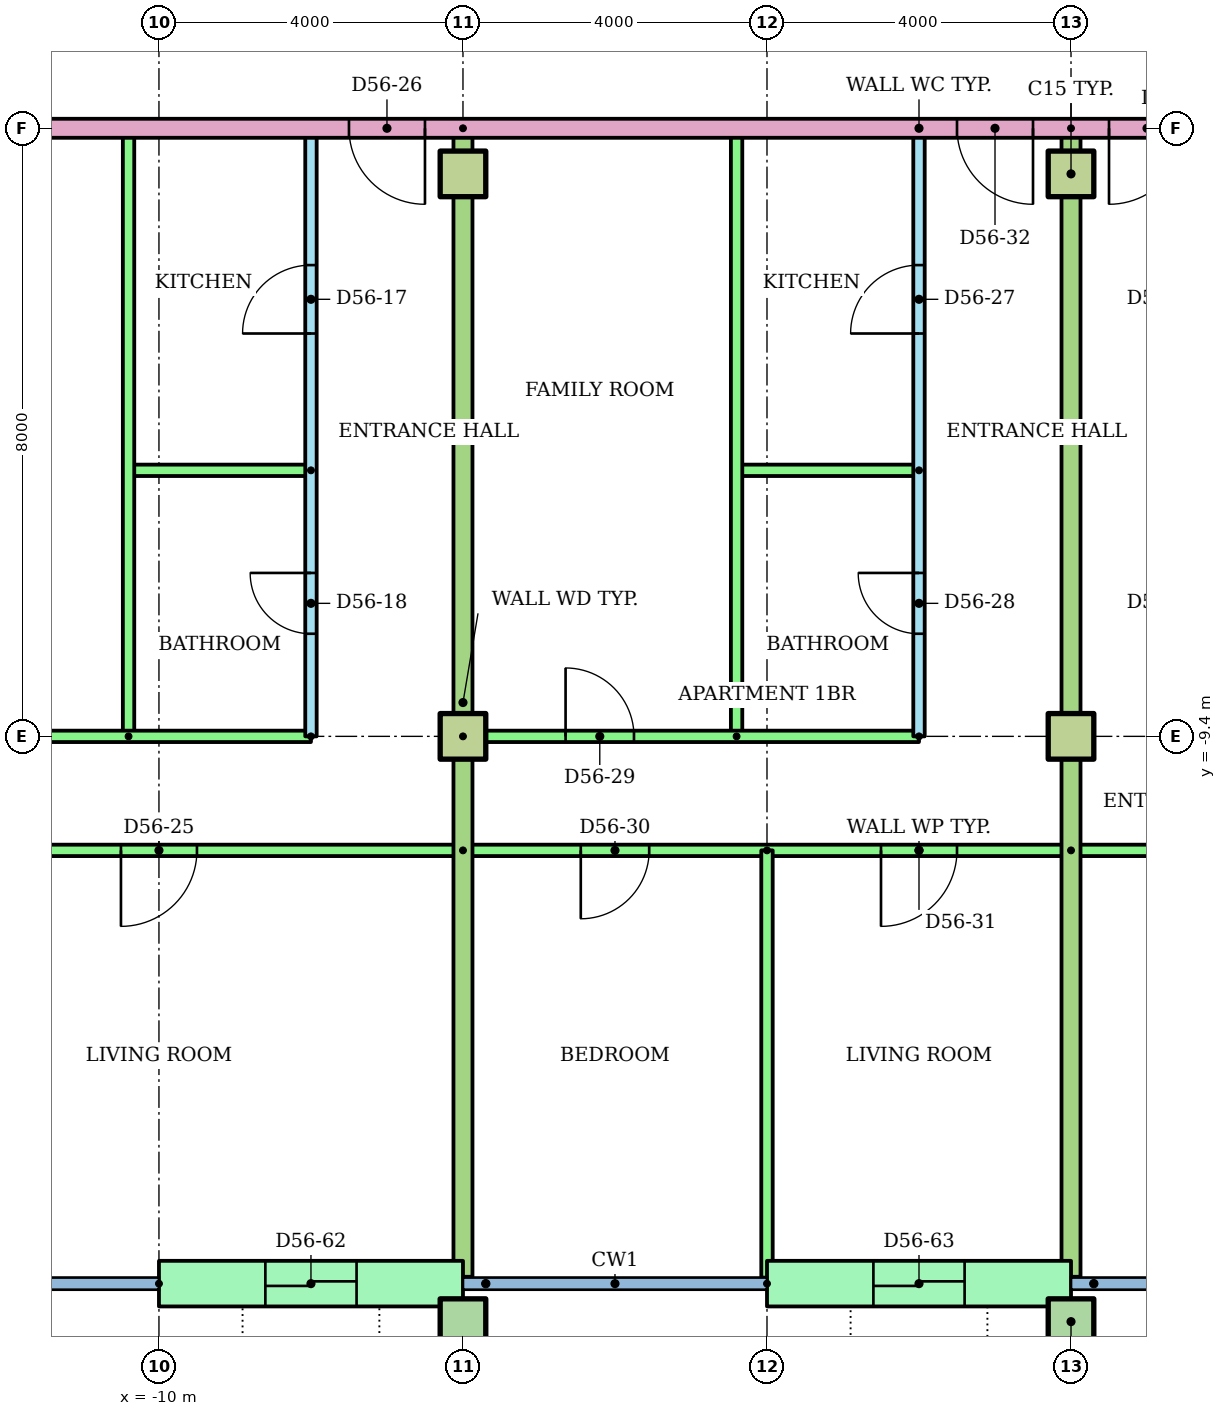
"""IFC4 building model, lengths in metres.
Left out: names, types, materials, properties, quantities, classifications, styles, units other than length and angle.
Written with IfcOpenShell. Run it as: python <this file> out.ifc"""

import sys

from ifc_helpers import new_model, si_unit, direction, frame, frame_2d, origin, origin_2d, place, context, subcontext, project, spatial, rectangle, hollow_rectangle, extrude, element, fill, save


model = new_model("IFC4")
c1 = context("Model", 3, precision=1e-05, world=origin(), true_north=direction((0.0, 1.0)))
c2 = subcontext(c1, "Body", "Model", "MODEL_VIEW")
j1 = project(units=[si_unit("LENGTHUNIT", "METRE"), si_unit("PLANEANGLEUNIT", "RADIAN")], contexts=[c1])
p1 = place(None, origin())
s1 = spatial("IfcSite", under=j1, at=p1, CompositionType="ELEMENT")
p2 = place(p1, origin())
s2 = spatial("IfcBuilding", under=s1, at=p2, CompositionType="ELEMENT")
p3 = place(p2, frame((0.0, 0.0, 217.2)))
s3 = spatial("IfcBuildingStorey", under=s2, at=p3, CompositionType="ELEMENT", Elevation=217.2)
for number, where in (
    (1, (-6.0, -17.1, 0.0)),
    (2, (2.0, -17.1, 0.0)),
):
    element("IfcColumn", number, at=place(p3, frame(where)), inside=s3, PredefinedType="COLUMN", context=c2, shape_type="SweptSolid", body=[
        extrude(hollow_rectangle(XDim=0.6, YDim=0.6, WallThickness=0.03, at=origin_2d()), origin(), (0.0, 0.0, 1.0), 3.2),
    ])
for number, where in (
    (3, (-6.0, -9.4, 0.0)),
    (4, (2.0, -9.4, 0.0)),
    (5, (-6.0, -2.0, 0.0)),
    (6, (2.0, -2.0, 0.0)),
):
    element("IfcColumn", number, at=place(p3, frame(where)), inside=s3, PredefinedType="COLUMN", context=c2, shape_type="SweptSolid", body=[
        extrude(rectangle(XDim=0.6, YDim=0.6, at=origin_2d()), origin(), (0.0, 0.0, 1.0), 3.2),
    ])
p4 = place(p3, frame((-10.0, -16.6, 0.0)))
e7 = element("IfcWall", 7, at=p4, inside=s3, PredefinedType="STANDARD", context=c2, shape_type="SweptSolid", body=[
    extrude(rectangle(XDim=4.0, YDim=0.6, at=frame_2d((2.0, 0.0))), origin(), (0.0, 0.0, 1.0), 2.92),
])
p5 = place(p4, frame((1.4, 0.0, 0.0)))
e8 = element("IfcOpeningElement", 8, at=p5, cuts=e7, PredefinedType="OPENING", context=c2, shape_type="SweptSolid", body=[
    extrude(rectangle(XDim=1.2, YDim=2.1, at=frame_2d((0.6, 1.05))), frame((0.0, 0.31, 0.0), z_axis=(0.0, -1.0, 0.0), x_axis=(1.0, 0.0, 0.0)), (0.0, 0.0, 1.0), 0.62),
])
p6 = place(p3, frame((-2.0, -16.6, 0.0)))
e9 = element("IfcWall", 9, at=p6, inside=s3, PredefinedType="STANDARD", context=c2, shape_type="SweptSolid", body=[
    extrude(rectangle(XDim=4.0, YDim=0.6, at=frame_2d((2.0, 0.0))), origin(), (0.0, 0.0, 1.0), 2.92),
])
p7 = place(p6, frame((1.4, 0.0, 0.0)))
e10 = element("IfcOpeningElement", 10, at=p7, cuts=e9, PredefinedType="OPENING", context=c2, shape_type="SweptSolid", body=[
    extrude(rectangle(XDim=1.2, YDim=2.1, at=frame_2d((0.6, 1.05))), frame((0.0, 0.31, 0.0), z_axis=(0.0, -1.0, 0.0), x_axis=(1.0, 0.0, 0.0)), (0.0, 0.0, 1.0), 0.62),
])
p8 = place(p3, frame((-8.0, -9.4, 0.0), z_axis=(0.0, 0.0, 1.0), x_axis=(0.0, 1.0, 0.0)))
e11 = element("IfcWall", 11, at=p8, inside=s3, PredefinedType="PARTITIONING", context=c2, shape_type="SweptSolid", body=[
    extrude(rectangle(XDim=8.0, YDim=0.15, at=frame_2d((4.0, 0.0))), origin(), (0.0, 0.0, 1.0), 2.4),
])
p9 = place(p8, frame((5.3, 0.0, 0.0)))
e12 = element("IfcOpeningElement", 12, at=p9, cuts=e11, PredefinedType="OPENING", context=c2, shape_type="SweptSolid", body=[
    extrude(rectangle(XDim=0.9, YDim=2.1, at=frame_2d((0.45, 1.05))), frame((0.0, 0.085, 0.0), z_axis=(0.0, -1.0, 0.0), x_axis=(1.0, 0.0, 0.0)), (0.0, 0.0, 1.0), 0.17),
])
p10 = place(p8, frame((1.35, 0.0, 0.0)))
e13 = element("IfcOpeningElement", 13, at=p10, cuts=e11, PredefinedType="OPENING", context=c2, shape_type="SweptSolid", body=[
    extrude(rectangle(XDim=0.8, YDim=2.1, at=frame_2d((0.4, 1.05))), frame((0.0, 0.085, 0.0), z_axis=(0.0, -1.0, 0.0), x_axis=(1.0, 0.0, 0.0)), (0.0, 0.0, 1.0), 0.17),
])
p11 = place(p3, frame((-8.0, -5.9, 0.0), z_axis=(0.0, 0.0, 1.0), x_axis=(-1.0, 0.0, 0.0)))
e14 = element("IfcWall", 14, at=p11, inside=s3, PredefinedType="PARTITIONING", context=c2, shape_type="SweptSolid", body=[
    extrude(rectangle(XDim=2.4, YDim=0.15, at=frame_2d((1.2, 0.0))), origin(), (0.0, 0.0, 1.0), 2.4),
])
p12 = place(p3, frame((-10.4, -9.4, 0.0), z_axis=(0.0, 0.0, 1.0), x_axis=(0.0, 1.0, 0.0)))
e15 = element("IfcWall", 15, at=p12, inside=s3, PredefinedType="PARTITIONING", context=c2, shape_type="SweptSolid", body=[
    extrude(rectangle(XDim=8.0, YDim=0.15, at=frame_2d((4.0, 0.0))), origin(), (0.0, 0.0, 1.0), 2.4),
])
p13 = place(p3, frame((-28.91, -9.4, 0.0)))
e16 = element("IfcWall", 16, at=p13, inside=s3, PredefinedType="PARTITIONING", context=c2, shape_type="SweptSolid", body=[
    extrude(rectangle(XDim=20.91, YDim=0.15, at=frame_2d((10.455, 0.0))), origin(), (0.0, 0.0, 1.0), 2.4),
])
p14 = place(p13, frame((15.81, 0.0, 0.0)))
e17 = element("IfcOpeningElement", 17, at=p14, cuts=e16, PredefinedType="OPENING", context=c2, shape_type="SweptSolid", body=[
    extrude(rectangle(XDim=0.9, YDim=2.1, at=frame_2d((0.45, 1.05))), frame((0.0, 0.085, 0.0), z_axis=(0.0, -1.0, 0.0), x_axis=(1.0, 0.0, 0.0)), (0.0, 0.0, 1.0), 0.17),
])
p15 = place(p13, frame((10.56, 0.0, 0.0)))
e18 = element("IfcOpeningElement", 18, at=p15, cuts=e16, PredefinedType="OPENING", context=c2, shape_type="SweptSolid", body=[
    extrude(rectangle(XDim=0.9, YDim=2.1, at=frame_2d((0.45, 1.05))), frame((0.0, 0.085, 0.0), z_axis=(0.0, -1.0, 0.0), x_axis=(1.0, 0.0, 0.0)), (0.0, 0.0, 1.0), 0.17),
])
p16 = place(p13, frame((3.66, 0.0, 0.0)))
e19 = element("IfcOpeningElement", 19, at=p16, cuts=e16, PredefinedType="OPENING", context=c2, shape_type="SweptSolid", body=[
    extrude(rectangle(XDim=0.9, YDim=2.1, at=frame_2d((0.45, 1.05))), frame((0.0, 0.085, 0.0), z_axis=(0.0, -1.0, 0.0), x_axis=(1.0, 0.0, 0.0)), (0.0, 0.0, 1.0), 0.17),
])
p17 = place(p3, frame((-6.0, -10.9, 0.0), z_axis=(0.0, 0.0, 1.0), x_axis=(-1.0, 0.0, 0.0)))
e20 = element("IfcWall", 20, at=p17, inside=s3, PredefinedType="PARTITIONING", context=c2, shape_type="SweptSolid", body=[
    extrude(rectangle(XDim=22.92, YDim=0.15, at=frame_2d((11.46, 0.0))), origin(), (0.0, 0.0, 1.0), 2.4),
])
p18 = place(p17, frame((20.0, 0.0, 0.0)))
e21 = element("IfcOpeningElement", 21, at=p18, cuts=e20, PredefinedType="OPENING", context=c2, shape_type="SweptSolid", body=[
    extrude(rectangle(XDim=0.9, YDim=2.1, at=frame_2d((0.45, 1.05))), frame((0.0, 0.085, 0.0), z_axis=(0.0, -1.0, 0.0), x_axis=(1.0, 0.0, 0.0)), (0.0, 0.0, 1.0), 0.17),
])
p19 = place(p17, frame((14.624, 0.0, 0.0)))
e22 = element("IfcOpeningElement", 22, at=p19, cuts=e20, PredefinedType="OPENING", context=c2, shape_type="SweptSolid", body=[
    extrude(rectangle(XDim=0.9, YDim=2.1, at=frame_2d((0.45, 1.05))), frame((0.0, 0.085, 0.0), z_axis=(0.0, -1.0, 0.0), x_axis=(1.0, 0.0, 0.0)), (0.0, 0.0, 1.0), 0.17),
])
p20 = place(p17, frame((9.55, 0.0, 0.0)))
e23 = element("IfcOpeningElement", 23, at=p20, cuts=e20, PredefinedType="OPENING", context=c2, shape_type="SweptSolid", body=[
    extrude(rectangle(XDim=0.9, YDim=2.1, at=frame_2d((0.45, 1.05))), frame((0.0, 0.085, 0.0), z_axis=(0.0, -1.0, 0.0), x_axis=(1.0, 0.0, 0.0)), (0.0, 0.0, 1.0), 0.17),
])
p21 = place(p17, frame((3.5, 0.0, 0.0)))
e24 = element("IfcOpeningElement", 24, at=p21, cuts=e20, PredefinedType="OPENING", context=c2, shape_type="SweptSolid", body=[
    extrude(rectangle(XDim=1.0, YDim=2.1, at=frame_2d((0.5, 1.05))), frame((0.0, 0.085, 0.0), z_axis=(0.0, -1.0, 0.0), x_axis=(1.0, 0.0, 0.0)), (0.0, 0.0, 1.0), 0.17),
])
p22 = place(p3, frame((0.0, -9.4, 0.0), z_axis=(0.0, 0.0, 1.0), x_axis=(0.0, 1.0, 0.0)))
e25 = element("IfcWall", 25, at=p22, inside=s3, PredefinedType="PARTITIONING", context=c2, shape_type="SweptSolid", body=[
    extrude(rectangle(XDim=8.0, YDim=0.15, at=frame_2d((4.0, 0.0))), origin(), (0.0, 0.0, 1.0), 2.4),
])
p23 = place(p22, frame((5.3, 0.0, 0.0)))
e26 = element("IfcOpeningElement", 26, at=p23, cuts=e25, PredefinedType="OPENING", context=c2, shape_type="SweptSolid", body=[
    extrude(rectangle(XDim=0.9, YDim=2.1, at=frame_2d((0.45, 1.05))), frame((0.0, 0.085, 0.0), z_axis=(0.0, -1.0, 0.0), x_axis=(1.0, 0.0, 0.0)), (0.0, 0.0, 1.0), 0.17),
])
p24 = place(p22, frame((1.35, 0.0, 0.0)))
e27 = element("IfcOpeningElement", 27, at=p24, cuts=e25, PredefinedType="OPENING", context=c2, shape_type="SweptSolid", body=[
    extrude(rectangle(XDim=0.8, YDim=2.1, at=frame_2d((0.4, 1.05))), frame((0.0, 0.085, 0.0), z_axis=(0.0, -1.0, 0.0), x_axis=(1.0, 0.0, 0.0)), (0.0, 0.0, 1.0), 0.17),
])
p25 = place(p3, frame((0.0, -5.9, 0.0), z_axis=(0.0, 0.0, 1.0), x_axis=(-1.0, 0.0, 0.0)))
e28 = element("IfcWall", 28, at=p25, inside=s3, PredefinedType="PARTITIONING", context=c2, shape_type="SweptSolid", body=[
    extrude(rectangle(XDim=2.4, YDim=0.15, at=frame_2d((1.2, 0.0))), origin(), (0.0, 0.0, 1.0), 2.4),
])
p26 = place(p3, frame((-2.4, -9.4, 0.0), z_axis=(0.0, 0.0, 1.0), x_axis=(0.0, 1.0, 0.0)))
e29 = element("IfcWall", 29, at=p26, inside=s3, PredefinedType="PARTITIONING", context=c2, shape_type="SweptSolid", body=[
    extrude(rectangle(XDim=8.0, YDim=0.15, at=frame_2d((4.0, 0.0))), origin(), (0.0, 0.0, 1.0), 2.4),
])
p27 = place(p3, frame((-6.0, -9.4, 0.0)))
e30 = element("IfcWall", 30, at=p27, inside=s3, PredefinedType="PARTITIONING", context=c2, shape_type="SweptSolid", body=[
    extrude(rectangle(XDim=6.0, YDim=0.15, at=frame_2d((3.0, 0.0))), origin(), (0.0, 0.0, 1.0), 2.4),
])
p28 = place(p27, frame((1.35, 0.0, 0.0)))
e31 = element("IfcOpeningElement", 31, at=p28, cuts=e30, PredefinedType="OPENING", context=c2, shape_type="SweptSolid", body=[
    extrude(rectangle(XDim=0.9, YDim=2.1, at=frame_2d((0.45, 1.05))), frame((0.0, 0.085, 0.0), z_axis=(0.0, -1.0, 0.0), x_axis=(1.0, 0.0, 0.0)), (0.0, 0.0, 1.0), 0.17),
])
p29 = place(p3, frame((2.0, -10.9, 0.0), z_axis=(0.0, 0.0, 1.0), x_axis=(-1.0, 0.0, 0.0)))
e32 = element("IfcWall", 32, at=p29, inside=s3, PredefinedType="PARTITIONING", context=c2, shape_type="SweptSolid", body=[
    extrude(rectangle(XDim=8.0, YDim=0.15, at=frame_2d((4.0, 0.0))), origin(), (0.0, 0.0, 1.0), 2.4),
])
p30 = place(p29, frame((5.55, 0.0, 0.0)))
e33 = element("IfcOpeningElement", 33, at=p30, cuts=e32, PredefinedType="OPENING", context=c2, shape_type="SweptSolid", body=[
    extrude(rectangle(XDim=0.9, YDim=2.1, at=frame_2d((0.45, 1.05))), frame((0.0, 0.085, 0.0), z_axis=(0.0, -1.0, 0.0), x_axis=(1.0, 0.0, 0.0)), (0.0, 0.0, 1.0), 0.17),
])
p31 = place(p29, frame((1.5, 0.0, 0.0)))
e34 = element("IfcOpeningElement", 34, at=p31, cuts=e32, PredefinedType="OPENING", context=c2, shape_type="SweptSolid", body=[
    extrude(rectangle(XDim=1.0, YDim=2.1, at=frame_2d((0.5, 1.05))), frame((0.0, 0.085, 0.0), z_axis=(0.0, -1.0, 0.0), x_axis=(1.0, 0.0, 0.0)), (0.0, 0.0, 1.0), 0.17),
])
p32 = place(p3, frame((-2.0, -10.9, 0.0), z_axis=(0.0, 0.0, 1.0), x_axis=(0.0, -1.0, 0.0)))
e35 = element("IfcWall", 35, at=p32, inside=s3, PredefinedType="PARTITIONING", context=c2, shape_type="SweptSolid", body=[
    extrude(rectangle(XDim=5.621, YDim=0.15, at=frame_2d((2.811, 0.0))), origin(), (0.0, 0.0, 1.0), 2.4),
])
p33 = place(p3, frame((-6.0, -1.4, 0.0), z_axis=(0.0, 0.0, 1.0), x_axis=(0.0, -1.0, 0.0)))
e36 = element("IfcWall", 36, at=p33, inside=s3, PredefinedType="PARTITIONING", context=c2, shape_type="SweptSolid", body=[
    extrude(rectangle(XDim=15.11, YDim=0.25, at=frame_2d((7.555, 0.0))), origin(), (0.0, 0.0, 1.0), 2.4),
])
p34 = place(p3, frame((28.92, -10.9, 0.0), z_axis=(0.0, 0.0, 1.0), x_axis=(-1.0, 0.0, 0.0)))
e37 = element("IfcWall", 37, at=p34, inside=s3, PredefinedType="PARTITIONING", context=c2, shape_type="SweptSolid", body=[
    extrude(rectangle(XDim=26.92, YDim=0.15, at=frame_2d((13.46, 0.0))), origin(), (0.0, 0.0, 1.0), 2.4),
])
p35 = place(p34, frame((22.42, 0.0, 0.0)))
e38 = element("IfcOpeningElement", 38, at=p35, cuts=e37, PredefinedType="OPENING", context=c2, shape_type="SweptSolid", body=[
    extrude(rectangle(XDim=1.0, YDim=2.1, at=frame_2d((0.5, 1.05))), frame((0.0, 0.085, 0.0), z_axis=(0.0, -1.0, 0.0), x_axis=(1.0, 0.0, 0.0)), (0.0, 0.0, 1.0), 0.17),
])
p36 = place(p34, frame((16.47, 0.0, 0.0)))
e39 = element("IfcOpeningElement", 39, at=p36, cuts=e37, PredefinedType="OPENING", context=c2, shape_type="SweptSolid", body=[
    extrude(rectangle(XDim=0.9, YDim=2.1, at=frame_2d((0.45, 1.05))), frame((0.0, 0.085, 0.0), z_axis=(0.0, -1.0, 0.0), x_axis=(1.0, 0.0, 0.0)), (0.0, 0.0, 1.0), 0.17),
])
p37 = place(p34, frame((12.47, 0.0, 0.0)))
e40 = element("IfcOpeningElement", 40, at=p37, cuts=e37, PredefinedType="OPENING", context=c2, shape_type="SweptSolid", body=[
    extrude(rectangle(XDim=0.9, YDim=2.1, at=frame_2d((0.45, 1.05))), frame((0.0, 0.085, 0.0), z_axis=(0.0, -1.0, 0.0), x_axis=(1.0, 0.0, 0.0)), (0.0, 0.0, 1.0), 0.17),
])
p38 = place(p34, frame((7.27, 0.0, 0.0)))
e41 = element("IfcOpeningElement", 41, at=p38, cuts=e37, PredefinedType="OPENING", context=c2, shape_type="SweptSolid", body=[
    extrude(rectangle(XDim=0.9, YDim=2.1, at=frame_2d((0.45, 1.05))), frame((0.0, 0.085, 0.0), z_axis=(0.0, -1.0, 0.0), x_axis=(1.0, 0.0, 0.0)), (0.0, 0.0, 1.0), 0.17),
])
p39 = place(p34, frame((1.544, 0.0, 0.0)))
e42 = element("IfcOpeningElement", 42, at=p39, cuts=e37, PredefinedType="OPENING", context=c2, shape_type="SweptSolid", body=[
    extrude(rectangle(XDim=0.9, YDim=2.1, at=frame_2d((0.45, 1.05))), frame((0.0, 0.085, 0.0), z_axis=(0.0, -1.0, 0.0), x_axis=(1.0, 0.0, 0.0)), (0.0, 0.0, 1.0), 0.17),
])
p40 = place(p3, frame((2.0, -1.4, 0.0), z_axis=(0.0, 0.0, 1.0), x_axis=(0.0, -1.0, 0.0)))
e43 = element("IfcWall", 43, at=p40, inside=s3, PredefinedType="PARTITIONING", context=c2, shape_type="SweptSolid", body=[
    extrude(rectangle(XDim=15.11, YDim=0.25, at=frame_2d((7.555, 0.0))), origin(), (0.0, 0.0, 1.0), 2.4),
])
p41 = place(p3, frame((14.0, -1.4, 0.0), z_axis=(0.0, 0.0, 1.0), x_axis=(-1.0, 0.0, 0.0)))
e44 = element("IfcWall", 44, at=p41, inside=s3, PredefinedType="PARTITIONING", context=c2, shape_type="SweptSolid", body=[
    extrude(rectangle(XDim=28.0, YDim=0.25, at=frame_2d((14.0, 0.0))), origin(), (0.0, 0.0, 1.0), 2.4),
])
p42 = place(p41, frame((20.5, 0.0, 0.0)))
e45 = element("IfcOpeningElement", 45, at=p42, cuts=e44, PredefinedType="OPENING", context=c2, shape_type="SweptSolid", body=[
    extrude(rectangle(XDim=1.0, YDim=2.1, at=frame_2d((0.5, 1.05))), frame((0.0, 0.135, 0.0), z_axis=(0.0, -1.0, 0.0), x_axis=(1.0, 0.0, 0.0)), (0.0, 0.0, 1.0), 0.27),
])
p43 = place(p41, frame((12.5, 0.0, 0.0)))
e46 = element("IfcOpeningElement", 46, at=p43, cuts=e44, PredefinedType="OPENING", context=c2, shape_type="SweptSolid", body=[
    extrude(rectangle(XDim=1.0, YDim=2.1, at=frame_2d((0.5, 1.05))), frame((0.0, 0.135, 0.0), z_axis=(0.0, -1.0, 0.0), x_axis=(1.0, 0.0, 0.0)), (0.0, 0.0, 1.0), 0.27),
])
p44 = place(p41, frame((10.5, 0.0, 0.0)))
e47 = element("IfcOpeningElement", 47, at=p44, cuts=e44, PredefinedType="OPENING", context=c2, shape_type="SweptSolid", body=[
    extrude(rectangle(XDim=1.0, YDim=2.1, at=frame_2d((0.5, 1.05))), frame((0.0, 0.135, 0.0), z_axis=(0.0, -1.0, 0.0), x_axis=(1.0, 0.0, 0.0)), (0.0, 0.0, 1.0), 0.27),
])
p45 = place(p9, origin())
e48 = element("IfcDoor", 48, at=p45, inside=s3, OperationType="SINGLE_SWING_LEFT", PredefinedType="DOOR", context=c2, shape_type="SweptSolid", body=[
    extrude(rectangle(XDim=0.9, YDim=2.1, at=frame_2d((0.45, 1.05))), frame((0.0, 0.025, 0.0), z_axis=(0.0, -1.0, 0.0), x_axis=(1.0, 0.0, 0.0)), (0.0, 0.0, 1.0), 0.05),
])
fill(e12, e48)
p46 = place(p10, origin())
e49 = element("IfcDoor", 49, at=p46, inside=s3, OperationType="SINGLE_SWING_RIGHT", PredefinedType="DOOR", context=c2, shape_type="SweptSolid", body=[
    extrude(rectangle(XDim=0.8, YDim=2.1, at=frame_2d((0.4, 1.05))), frame((0.0, 0.025, 0.0), z_axis=(0.0, -1.0, 0.0), x_axis=(1.0, 0.0, 0.0)), (0.0, 0.0, 1.0), 0.05),
])
fill(e13, e49)
p47 = place(p21, origin())
e50 = element("IfcDoor", 50, at=p47, inside=s3, OperationType="SINGLE_SWING_RIGHT", PredefinedType="DOOR", context=c2, shape_type="SweptSolid", body=[
    extrude(rectangle(XDim=1.0, YDim=2.1, at=frame_2d((0.5, 1.05))), frame((0.0, 0.025, 0.0), z_axis=(0.0, -1.0, 0.0), x_axis=(1.0, 0.0, 0.0)), (0.0, 0.0, 1.0), 0.05),
])
fill(e24, e50)
p48 = place(p42, origin())
e51 = element("IfcDoor", 51, at=p48, inside=s3, OperationType="SINGLE_SWING_LEFT", PredefinedType="DOOR", context=c2, shape_type="SweptSolid", body=[
    extrude(rectangle(XDim=1.0, YDim=2.1, at=frame_2d((0.5, 1.05))), frame((0.0, 0.025, 0.0), z_axis=(0.0, -1.0, 0.0), x_axis=(1.0, 0.0, 0.0)), (0.0, 0.0, 1.0), 0.05),
])
fill(e45, e51)
p49 = place(p23, origin())
e52 = element("IfcDoor", 52, at=p49, inside=s3, OperationType="SINGLE_SWING_LEFT", PredefinedType="DOOR", context=c2, shape_type="SweptSolid", body=[
    extrude(rectangle(XDim=0.9, YDim=2.1, at=frame_2d((0.45, 1.05))), frame((0.0, 0.025, 0.0), z_axis=(0.0, -1.0, 0.0), x_axis=(1.0, 0.0, 0.0)), (0.0, 0.0, 1.0), 0.05),
])
fill(e26, e52)
p50 = place(p24, origin())
e53 = element("IfcDoor", 53, at=p50, inside=s3, OperationType="SINGLE_SWING_RIGHT", PredefinedType="DOOR", context=c2, shape_type="SweptSolid", body=[
    extrude(rectangle(XDim=0.8, YDim=2.1, at=frame_2d((0.4, 1.05))), frame((0.0, 0.025, 0.0), z_axis=(0.0, -1.0, 0.0), x_axis=(1.0, 0.0, 0.0)), (0.0, 0.0, 1.0), 0.05),
])
fill(e27, e53)
p51 = place(p28, origin())
e54 = element("IfcDoor", 54, at=p51, inside=s3, OperationType="SINGLE_SWING_LEFT", PredefinedType="DOOR", context=c2, shape_type="SweptSolid", body=[
    extrude(rectangle(XDim=0.9, YDim=2.1, at=frame_2d((0.45, 1.05))), frame((0.0, 0.025, 0.0), z_axis=(0.0, -1.0, 0.0), x_axis=(1.0, 0.0, 0.0)), (0.0, 0.0, 1.0), 0.05),
])
fill(e31, e54)
p52 = place(p30, origin())
e55 = element("IfcDoor", 55, at=p52, inside=s3, OperationType="SINGLE_SWING_RIGHT", PredefinedType="DOOR", context=c2, shape_type="SweptSolid", body=[
    extrude(rectangle(XDim=0.9, YDim=2.1, at=frame_2d((0.45, 1.05))), frame((0.0, 0.025, 0.0), z_axis=(0.0, -1.0, 0.0), x_axis=(1.0, 0.0, 0.0)), (0.0, 0.0, 1.0), 0.05),
])
fill(e33, e55)
p53 = place(p31, origin())
e56 = element("IfcDoor", 56, at=p53, inside=s3, OperationType="SINGLE_SWING_RIGHT", PredefinedType="DOOR", context=c2, shape_type="SweptSolid", body=[
    extrude(rectangle(XDim=1.0, YDim=2.1, at=frame_2d((0.5, 1.05))), frame((0.0, 0.025, 0.0), z_axis=(0.0, -1.0, 0.0), x_axis=(1.0, 0.0, 0.0)), (0.0, 0.0, 1.0), 0.05),
])
fill(e34, e56)
p54 = place(p43, origin())
e57 = element("IfcDoor", 57, at=p54, inside=s3, OperationType="SINGLE_SWING_LEFT", PredefinedType="DOOR", context=c2, shape_type="SweptSolid", body=[
    extrude(rectangle(XDim=1.0, YDim=2.1, at=frame_2d((0.5, 1.05))), frame((0.0, 0.025, 0.0), z_axis=(0.0, -1.0, 0.0), x_axis=(1.0, 0.0, 0.0)), (0.0, 0.0, 1.0), 0.05),
])
fill(e46, e57)
p55 = place(p44, origin())
e58 = element("IfcDoor", 58, at=p55, inside=s3, OperationType="SINGLE_SWING_RIGHT", PredefinedType="DOOR", context=c2, shape_type="SweptSolid", body=[
    extrude(rectangle(XDim=1.0, YDim=2.1, at=frame_2d((0.5, 1.05))), frame((0.0, 0.025, 0.0), z_axis=(0.0, -1.0, 0.0), x_axis=(1.0, 0.0, 0.0)), (0.0, 0.0, 1.0), 0.05),
])
fill(e47, e58)
p56 = place(p5, origin())
e59 = element("IfcDoor", 59, at=p56, inside=s3, OperationType="SLIDING_TO_LEFT", PredefinedType="DOOR", context=c2, shape_type="SweptSolid", body=[
    extrude(rectangle(XDim=1.2, YDim=2.1, at=frame_2d((0.6, 1.05))), frame((0.0, 0.025, 0.0), z_axis=(0.0, -1.0, 0.0), x_axis=(1.0, 0.0, 0.0)), (0.0, 0.0, 1.0), 0.05),
])
fill(e8, e59)
p57 = place(p7, origin())
e60 = element("IfcDoor", 60, at=p57, inside=s3, OperationType="SLIDING_TO_LEFT", PredefinedType="DOOR", context=c2, shape_type="SweptSolid", body=[
    extrude(rectangle(XDim=1.2, YDim=2.1, at=frame_2d((0.6, 1.05))), frame((0.0, 0.025, 0.0), z_axis=(0.0, -1.0, 0.0), x_axis=(1.0, 0.0, 0.0)), (0.0, 0.0, 1.0), 0.05),
])
fill(e10, e60)
save(model, sys.argv[1])
